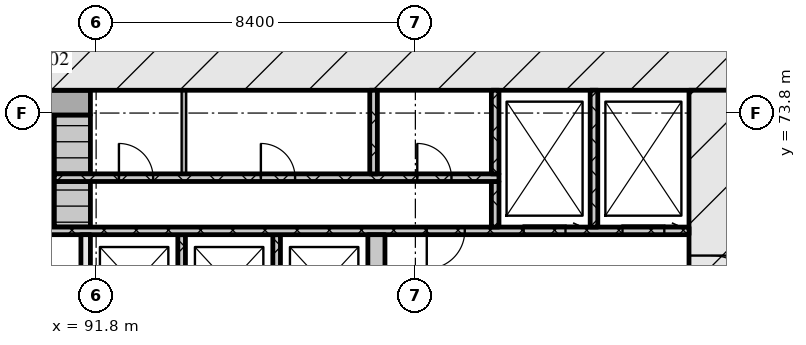
"""IFC4 building model, lengths in metres.
Left out: names, types, materials, properties, quantities, classifications, styles, units other than length and angle.
Written with IfcOpenShell. Run it as: python <this file> out.ifc"""

import sys

from ifc_helpers import new_model, si_unit, direction, frame, frame_2d, origin, place, context, subcontext, project, spatial, rectangle, extrude, element, fill, save


model = new_model("IFC4")
c1 = context("Model", 3, precision=1e-05, world=origin(), true_north=direction((0.0, 1.0)))
c2 = subcontext(c1, "Body", "Model", "MODEL_VIEW")
j1 = project(units=[si_unit("LENGTHUNIT", "METRE"), si_unit("PLANEANGLEUNIT", "RADIAN")], contexts=[c1])
p1 = place(None, origin())
s1 = spatial("IfcSite", under=j1, at=p1, CompositionType="ELEMENT")
p2 = place(p1, origin())
s2 = spatial("IfcBuilding", under=s1, at=p2, CompositionType="ELEMENT")
p3 = place(p2, origin())
s3 = spatial("IfcBuildingStorey", under=s2, at=p3, CompositionType="ELEMENT", Elevation=0.0)
p4 = place(p3, frame((66.6, 75.0, 0.0), z_axis=(0.0, 0.0, 1.0), x_axis=(1.0, 0.0, 0.0)))
e1 = element("IfcWall", 1, at=p4, inside=s3, PredefinedType="SOLIDWALL", context=c2, shape_type="SweptSolid", body=[
    extrude(rectangle(XDim=42.0, YDim=1.2, at=frame_2d((21.0, 0.0))), origin(), (0.0, 0.0, 1.0), 8.7),
])
p5 = place(p3, frame((108.0, 62.4, 0.0), z_axis=(0.0, 0.0, 1.0), x_axis=(0.0, 1.0, 0.0)))
e2 = element("IfcWall", 2, at=p5, inside=s3, PredefinedType="SOLIDWALL", context=c2, shape_type="SweptSolid", body=[
    extrude(rectangle(XDim=12.0, YDim=1.2, at=frame_2d((6.0, 0.0))), origin(), (0.0, 0.0, 1.0), 8.7),
])
p6 = place(p5, frame((6.45, 0.0, 0.0)))
e3 = element("IfcOpeningElement", 3, at=p6, cuts=e2, PredefinedType="OPENING", context=c2, shape_type="SweptSolid", body=[
    extrude(rectangle(XDim=1.2, YDim=2.1, at=frame_2d((0.6, 1.05))), frame((0.0, 0.61, 0.0), z_axis=(0.0, -1.0, 0.0), x_axis=(1.0, 0.0, 0.0)), (0.0, 0.0, 1.0), 1.22),
])
p7 = place(p3, frame((91.525, 68.0, 0.0), z_axis=(0.0, 0.0, 1.0), x_axis=(0.0, 1.0, 0.0)))
e4 = element("IfcWall", 4, at=p7, inside=s3, PredefinedType="SOLIDWALL", context=c2, shape_type="SweptSolid", body=[
    extrude(rectangle(XDim=2.6, YDim=0.25, at=frame_2d((1.3, 0.0))), origin(), (0.0, 0.0, 1.0), 8.7),
])
for number, where, z_axis, x_axis in (
    (5, (94.05, 68.0, 0.0), (0.0, 0.0, 1.0), (0.0, 1.0, 0.0)),
    (6, (96.55, 68.0, 0.0), (0.0, 0.0, 1.0), (0.0, 1.0, 0.0)),
):
    element("IfcWall", number, at=place(p3, frame(where, z_axis=z_axis, x_axis=x_axis)), inside=s3, PredefinedType="SOLIDWALL", context=c2, shape_type="SweptSolid", body=[
        extrude(rectangle(XDim=2.6, YDim=0.2, at=frame_2d((1.3, 0.0))), origin(), (0.0, 0.0, 1.0), 8.7),
    ])
p8 = place(p3, frame((99.175, 68.3, 0.0), z_axis=(0.0, 0.0, 1.0), x_axis=(0.0, 1.0, 0.0)))
e7 = element("IfcWall", 7, at=p8, inside=s3, PredefinedType="SOLIDWALL", context=c2, shape_type="SweptSolid", body=[
    extrude(rectangle(XDim=2.3, YDim=0.45, at=frame_2d((1.15, 0.0))), origin(), (0.0, 0.0, 1.0), 8.7),
])
p9 = place(p3, frame((67.8, 70.7, 0.0), z_axis=(0.0, 0.0, 1.0), x_axis=(1.0, 0.0, 0.0)))
e8 = element("IfcWall", 8, at=p9, inside=s3, PredefinedType="SOLIDWALL", context=c2, shape_type="SweptSolid", body=[
    extrude(rectangle(XDim=39.6, YDim=0.2, at=frame_2d((19.8, 0.0))), origin(), (0.0, 0.0, 1.0), 8.7),
])
p10 = place(p9, frame((0.65, 0.0, 0.0)))
e9 = element("IfcOpeningElement", 9, at=p10, cuts=e8, PredefinedType="OPENING", context=c2, shape_type="SweptSolid", body=[
    extrude(rectangle(XDim=1.1, YDim=2.1, at=frame_2d((0.55, 1.05))), frame((0.0, 0.11, 0.0), z_axis=(0.0, -1.0, 0.0), x_axis=(1.0, 0.0, 0.0)), (0.0, 0.0, 1.0), 0.22),
])
p11 = place(p9, frame((3.25, 0.0, 0.0)))
e10 = element("IfcOpeningElement", 10, at=p11, cuts=e8, PredefinedType="OPENING", context=c2, shape_type="SweptSolid", body=[
    extrude(rectangle(XDim=1.1, YDim=2.1, at=frame_2d((0.55, 1.05))), frame((0.0, 0.11, 0.0), z_axis=(0.0, -1.0, 0.0), x_axis=(1.0, 0.0, 0.0)), (0.0, 0.0, 1.0), 0.22),
])
p12 = place(p9, frame((5.9, 0.0, 0.0)))
e11 = element("IfcOpeningElement", 11, at=p12, cuts=e8, PredefinedType="OPENING", context=c2, shape_type="SweptSolid", body=[
    extrude(rectangle(XDim=1.0, YDim=2.1, at=frame_2d((0.5, 1.05))), frame((0.0, 0.11, 0.0), z_axis=(0.0, -1.0, 0.0), x_axis=(1.0, 0.0, 0.0)), (0.0, 0.0, 1.0), 0.22),
])
p13 = place(p9, frame((21.7, 0.0, 0.0)))
e12 = element("IfcOpeningElement", 12, at=p13, cuts=e8, PredefinedType="OPENING", context=c2, shape_type="SweptSolid", body=[
    extrude(rectangle(XDim=1.0, YDim=2.1, at=frame_2d((0.5, 1.05))), frame((0.0, 0.11, 0.0), z_axis=(0.0, -1.0, 0.0), x_axis=(1.0, 0.0, 0.0)), (0.0, 0.0, 1.0), 0.22),
])
p14 = place(p9, frame((32.7, 0.0, 0.0)))
e13 = element("IfcOpeningElement", 13, at=p14, cuts=e8, PredefinedType="OPENING", context=c2, shape_type="SweptSolid", body=[
    extrude(rectangle(XDim=1.0, YDim=2.1, at=frame_2d((0.5, 1.05))), frame((0.0, 0.11, 0.0), z_axis=(0.0, -1.0, 0.0), x_axis=(1.0, 0.0, 0.0)), (0.0, 0.0, 1.0), 0.22),
])
p15 = place(p9, frame((35.25, 0.0, 0.0)))
e14 = element("IfcOpeningElement", 14, at=p15, cuts=e8, PredefinedType="OPENING", context=c2, shape_type="SweptSolid", body=[
    extrude(rectangle(XDim=1.1, YDim=2.1, at=frame_2d((0.55, 1.05))), frame((0.0, 0.11, 0.0), z_axis=(0.0, -1.0, 0.0), x_axis=(1.0, 0.0, 0.0)), (0.0, 0.0, 1.0), 0.22),
])
p16 = place(p9, frame((37.85, 0.0, 0.0)))
e15 = element("IfcOpeningElement", 15, at=p16, cuts=e8, PredefinedType="OPENING", context=c2, shape_type="SweptSolid", body=[
    extrude(rectangle(XDim=1.1, YDim=2.1, at=frame_2d((0.55, 1.05))), frame((0.0, 0.11, 0.0), z_axis=(0.0, -1.0, 0.0), x_axis=(1.0, 0.0, 0.0)), (0.0, 0.0, 1.0), 0.22),
])
p17 = place(p3, frame((91.175, 70.8, 0.0), z_axis=(0.0, 0.0, 1.0), x_axis=(0.0, 1.0, 0.0)))
e16 = element("IfcWall", 16, at=p17, inside=s3, PredefinedType="SOLIDWALL", context=c2, shape_type="SweptSolid", body=[
    extrude(rectangle(XDim=1.2, YDim=0.95, at=frame_2d((0.6, 0.0))), origin(), (0.0, 0.0, 1.0), 8.7),
])
p18 = place(p3, frame((102.3, 70.8, 0.0), z_axis=(0.0, 0.0, 1.0), x_axis=(0.0, 1.0, 0.0)))
e17 = element("IfcWall", 17, at=p18, inside=s3, PredefinedType="SOLIDWALL", context=c2, shape_type="SweptSolid", body=[
    extrude(rectangle(XDim=1.2, YDim=0.2, at=frame_2d((0.6, 0.0))), origin(), (0.0, 0.0, 1.0), 8.7),
])
p19 = place(p3, frame((104.9, 70.8, 0.0), z_axis=(0.0, 0.0, 1.0), x_axis=(0.0, 1.0, 0.0)))
e18 = element("IfcWall", 18, at=p19, inside=s3, PredefinedType="SOLIDWALL", context=c2, shape_type="SweptSolid", body=[
    extrude(rectangle(XDim=3.6, YDim=0.2, at=frame_2d((1.8, 0.0))), origin(), (0.0, 0.0, 1.0), 8.7),
])
p20 = place(p3, frame((90.7, 72.1, 0.0), z_axis=(0.0, 0.0, 1.0), x_axis=(1.0, 0.0, 0.0)))
e19 = element("IfcWall", 19, at=p20, inside=s3, PredefinedType="SOLIDWALL", context=c2, shape_type="SweptSolid", body=[
    extrude(rectangle(XDim=11.7, YDim=0.2, at=frame_2d((5.85, 0.0))), origin(), (0.0, 0.0, 1.0), 8.7),
])
p21 = place(p20, frame((1.7, 0.0, 0.0)))
e20 = element("IfcOpeningElement", 20, at=p21, cuts=e19, PredefinedType="OPENING", context=c2, shape_type="SweptSolid", body=[
    extrude(rectangle(XDim=0.9, YDim=2.1, at=frame_2d((0.45, 1.05))), frame((0.0, 0.11, 0.0), z_axis=(0.0, -1.0, 0.0), x_axis=(1.0, 0.0, 0.0)), (0.0, 0.0, 1.0), 0.22),
])
p22 = place(p20, frame((5.435, 0.0, 0.0)))
e21 = element("IfcOpeningElement", 21, at=p22, cuts=e19, PredefinedType="OPENING", context=c2, shape_type="SweptSolid", body=[
    extrude(rectangle(XDim=0.9, YDim=2.1, at=frame_2d((0.45, 1.05))), frame((0.0, 0.11, 0.0), z_axis=(0.0, -1.0, 0.0), x_axis=(1.0, 0.0, 0.0)), (0.0, 0.0, 1.0), 0.22),
])
p23 = place(p20, frame((9.55, 0.0, 0.0)))
e22 = element("IfcOpeningElement", 22, at=p23, cuts=e19, PredefinedType="OPENING", context=c2, shape_type="SweptSolid", body=[
    extrude(rectangle(XDim=0.9, YDim=2.1, at=frame_2d((0.45, 1.05))), frame((0.0, 0.11, 0.0), z_axis=(0.0, -1.0, 0.0), x_axis=(1.0, 0.0, 0.0)), (0.0, 0.0, 1.0), 0.22),
])
p24 = place(p3, frame((91.175, 72.2, 0.0), z_axis=(0.0, 0.0, 1.0), x_axis=(0.0, 1.0, 0.0)))
e23 = element("IfcWall", 23, at=p24, inside=s3, PredefinedType="SOLIDWALL", context=c2, shape_type="SweptSolid", body=[
    extrude(rectangle(XDim=1.55, YDim=0.95, at=frame_2d((0.775, 0.0))), origin(), (0.0, 0.0, 1.0), 8.7),
])
p25 = place(p3, frame((94.11, 72.2, 0.0), z_axis=(0.0, 0.0, 1.0), x_axis=(0.0, 1.0, 0.0)))
e24 = element("IfcWall", 24, at=p25, inside=s3, PredefinedType="PARTITIONING", context=c2, shape_type="SweptSolid", body=[
    extrude(rectangle(XDim=2.2, YDim=0.12, at=frame_2d((1.1, 0.0))), origin(), (0.0, 0.0, 1.0), 8.7),
])
for number, where, z_axis, x_axis in (
    (25, (99.1, 72.2, 0.0), (0.0, 0.0, 1.0), (0.0, 1.0, 0.0)),
    (26, (102.3, 72.2, 0.0), (0.0, 0.0, 1.0), (0.0, 1.0, 0.0)),
):
    element("IfcWall", number, at=place(p3, frame(where, z_axis=z_axis, x_axis=x_axis)), inside=s3, PredefinedType="SOLIDWALL", context=c2, shape_type="SweptSolid", body=[
        extrude(rectangle(XDim=2.2, YDim=0.2, at=frame_2d((1.1, 0.0))), origin(), (0.0, 0.0, 1.0), 8.7),
    ])
p26 = place(p3, frame((83.55, 74.075, 0.0), z_axis=(0.0, 0.0, 1.0), x_axis=(1.0, 0.0, 0.0)))
e27 = element("IfcWall", 27, at=p26, inside=s3, PredefinedType="SOLIDWALL", context=c2, shape_type="SweptSolid", body=[
    extrude(rectangle(XDim=8.1, YDim=0.65, at=frame_2d((4.05, 0.0))), origin(), (0.0, 0.0, 1.0), 8.7),
])
p27 = place(p6, origin())
e28 = element("IfcDoor", 28, at=p27, inside=s3, OperationType="SINGLE_SWING_RIGHT", PredefinedType="DOOR", context=c2, shape_type="SweptSolid", body=[
    extrude(rectangle(XDim=1.2, YDim=2.1, at=frame_2d((0.6, 1.05))), frame((0.0, 0.025, 0.0), z_axis=(0.0, -1.0, 0.0), x_axis=(1.0, 0.0, 0.0)), (0.0, 0.0, 1.0), 0.05),
])
fill(e3, e28)
p28 = place(p14, origin())
e29 = element("IfcDoor", 29, at=p28, inside=s3, OperationType="SINGLE_SWING_RIGHT", PredefinedType="DOOR", context=c2, shape_type="SweptSolid", body=[
    extrude(rectangle(XDim=1.0, YDim=2.1, at=frame_2d((0.5, 1.05))), frame((0.0, 0.025, 0.0), z_axis=(0.0, -1.0, 0.0), x_axis=(1.0, 0.0, 0.0)), (0.0, 0.0, 1.0), 0.05),
])
fill(e13, e29)
p29 = place(p15, origin())
e30 = element("IfcDoor", 30, at=p29, inside=s3, OperationType="SLIDING_TO_RIGHT", PredefinedType="DOOR", context=c2, shape_type="SweptSolid", body=[
    extrude(rectangle(XDim=1.1, YDim=2.1, at=frame_2d((0.55, 1.05))), frame((0.0, 0.025, 0.0), z_axis=(0.0, -1.0, 0.0), x_axis=(1.0, 0.0, 0.0)), (0.0, 0.0, 1.0), 0.05),
])
fill(e14, e30)
p30 = place(p16, origin())
e31 = element("IfcDoor", 31, at=p30, inside=s3, OperationType="SLIDING_TO_RIGHT", PredefinedType="DOOR", context=c2, shape_type="SweptSolid", body=[
    extrude(rectangle(XDim=1.1, YDim=2.1, at=frame_2d((0.55, 1.05))), frame((0.0, 0.025, 0.0), z_axis=(0.0, -1.0, 0.0), x_axis=(1.0, 0.0, 0.0)), (0.0, 0.0, 1.0), 0.05),
])
fill(e15, e31)
p31 = place(p21, origin())
e32 = element("IfcDoor", 32, at=p31, inside=s3, OperationType="SINGLE_SWING_LEFT", PredefinedType="DOOR", context=c2, shape_type="SweptSolid", body=[
    extrude(rectangle(XDim=0.9, YDim=2.1, at=frame_2d((0.45, 1.05))), frame((0.0, 0.025, 0.0), z_axis=(0.0, -1.0, 0.0), x_axis=(1.0, 0.0, 0.0)), (0.0, 0.0, 1.0), 0.05),
])
fill(e20, e32)
p32 = place(p22, origin())
e33 = element("IfcDoor", 33, at=p32, inside=s3, OperationType="SINGLE_SWING_LEFT", PredefinedType="DOOR", context=c2, shape_type="SweptSolid", body=[
    extrude(rectangle(XDim=0.9, YDim=2.1, at=frame_2d((0.45, 1.05))), frame((0.0, 0.025, 0.0), z_axis=(0.0, -1.0, 0.0), x_axis=(1.0, 0.0, 0.0)), (0.0, 0.0, 1.0), 0.05),
])
fill(e21, e33)
p33 = place(p23, origin())
e34 = element("IfcDoor", 34, at=p33, inside=s3, OperationType="SINGLE_SWING_LEFT", PredefinedType="DOOR", context=c2, shape_type="SweptSolid", body=[
    extrude(rectangle(XDim=0.9, YDim=2.1, at=frame_2d((0.45, 1.05))), frame((0.0, 0.025, 0.0), z_axis=(0.0, -1.0, 0.0), x_axis=(1.0, 0.0, 0.0)), (0.0, 0.0, 1.0), 0.05),
])
fill(e22, e34)
save(model, sys.argv[1])
